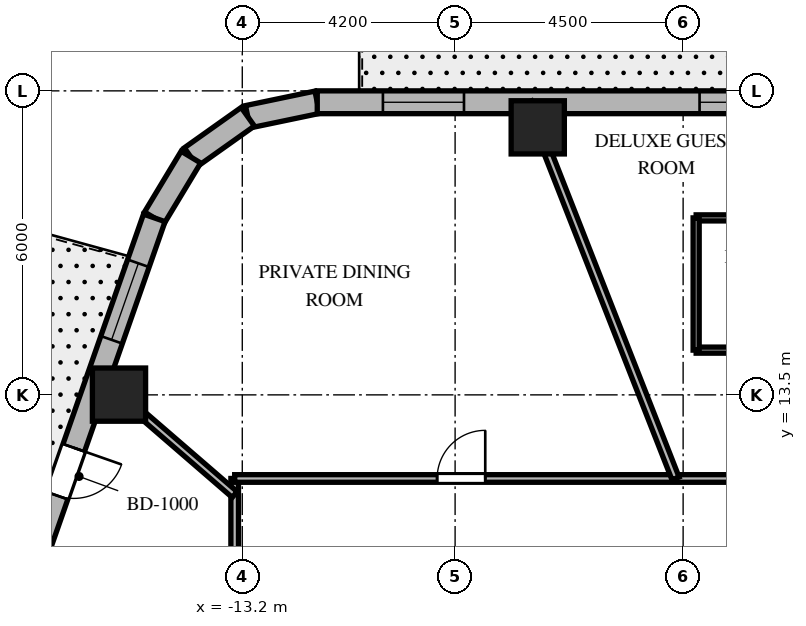
"""IFC4 building model, lengths in metres.
Left out: names, types, materials, properties, quantities, classifications, styles, units other than length and angle.
Written with IfcOpenShell. Run it as: python <this file> out.ifc"""

import sys

from ifc_helpers import new_model, si_unit, direction, frame, frame_2d, origin, origin_2d, place, context, subcontext, project, spatial, rectangle, extrude, element, fill, save


model = new_model("IFC4")
c1 = context("Model", 3, precision=1e-05, world=origin(), true_north=direction((0.0, 1.0)))
c2 = subcontext(c1, "Body", "Model", "MODEL_VIEW")
j1 = project(units=[si_unit("LENGTHUNIT", "METRE"), si_unit("PLANEANGLEUNIT", "RADIAN")], contexts=[c1])
p1 = place(None, origin())
s1 = spatial("IfcSite", under=j1, at=p1, CompositionType="ELEMENT")
p2 = place(p1, origin())
s2 = spatial("IfcBuilding", under=s1, at=p2, CompositionType="ELEMENT")
p3 = place(p2, frame((0.0, 0.0, 159.1)))
s3 = spatial("IfcBuildingStorey", under=s2, at=p3, CompositionType="ELEMENT", Elevation=159.1)
for number, where, z_axis, x_axis in (
    (1, (-7.369, 18.78, 0.0), (0.0, 0.0, 1.0), (1.0, 0.0, 0.0)),
    (2, (-15.633, 13.505, 0.0), (0.0, 0.0, 1.0), (1.0, 0.0, 0.0)),
):
    element("IfcColumn", number, at=place(p3, frame(where, z_axis=z_axis, x_axis=x_axis)), inside=s3, PredefinedType="COLUMN", context=c2, shape_type="SweptSolid", body=[
        extrude(rectangle(XDim=1.05, YDim=1.05, at=origin_2d()), origin(), (0.0, 0.0, 1.0), 3.7),
    ])
p4 = place(p3, frame((-11.72, 19.275, 0.0), z_axis=(0.0, 0.0, 1.0), x_axis=(-0.97893106758, -0.204191001093, 0.0)))
e3 = element("IfcWall", 3, at=p4, inside=s3, PredefinedType="SOLIDWALL", context=c2, shape_type="SweptSolid", body=[
    extrude(rectangle(XDim=1.4, YDim=0.45, at=frame_2d((0.7, 0.0))), origin(), (0.0, 0.0, 1.0), 3.4),
])
p5 = place(p3, frame((-13.091, 18.989, 0.0), z_axis=(0.0, 0.0, 1.0), x_axis=(-0.815574637848, -0.578651890258, 0.0)))
e4 = element("IfcWall", 4, at=p5, inside=s3, PredefinedType="SOLIDWALL", context=c2, shape_type="SweptSolid", body=[
    extrude(rectangle(XDim=1.377, YDim=0.45, at=frame_2d((0.688, 0.0))), origin(), (0.0, 0.0, 1.0), 3.4),
])
p6 = place(p3, frame((-14.214, 18.192, 0.0), z_axis=(0.0, 0.0, 1.0), x_axis=(-0.516340945502, -0.856383108193, 0.0)))
e5 = element("IfcWall", 5, at=p6, inside=s3, PredefinedType="SOLIDWALL", context=c2, shape_type="SweptSolid", body=[
    extrude(rectangle(XDim=1.4, YDim=0.45, at=frame_2d((0.7, 0.0))), origin(), (0.0, 0.0, 1.0), 3.4),
])
p7 = place(p3, frame((10.108, 19.275, 0.0), z_axis=(0.0, 0.0, 1.0), x_axis=(-1.0, 0.0, 0.0)))
e6 = element("IfcWall", 6, at=p7, inside=s3, PredefinedType="SOLIDWALL", context=c2, shape_type="SweptSolid", body=[
    extrude(rectangle(XDim=21.829, YDim=0.45, at=frame_2d((10.915, 0.0))), origin(), (0.0, 0.0, 1.0), 3.4),
])
p8 = place(p7, frame((5.503, 0.0, 0.0)))
e7 = element("IfcOpeningElement", 7, at=p8, cuts=e6, PredefinedType="OPENING", context=c2, shape_type="SweptSolid", body=[
    extrude(rectangle(XDim=0.95, YDim=2.15, at=frame_2d((0.475, 1.075))), frame((0.0, 0.235, 0.0), z_axis=(0.0, -1.0, 0.0), x_axis=(1.0, 0.0, 0.0)), (0.0, 0.0, 1.0), 0.47),
])
p9 = place(p7, frame((1.297, 0.0, 0.8)))
e8 = element("IfcOpeningElement", 8, at=p9, cuts=e6, PredefinedType="OPENING", context=c2, shape_type="SweptSolid", body=[
    extrude(rectangle(XDim=1.6, YDim=1.75, at=frame_2d((0.8, 0.875))), frame((0.0, 0.235, 0.0), z_axis=(0.0, -1.0, 0.0), x_axis=(1.0, 0.0, 0.0)), (0.0, 0.0, 1.0), 0.47),
])
p10 = place(p7, frame((7.402, 0.0, 0.8)))
e9 = element("IfcOpeningElement", 9, at=p10, cuts=e6, PredefinedType="OPENING", context=c2, shape_type="SweptSolid", body=[
    extrude(rectangle(XDim=1.6, YDim=1.75, at=frame_2d((0.8, 0.875))), frame((0.0, 0.235, 0.0), z_axis=(0.0, -1.0, 0.0), x_axis=(1.0, 0.0, 0.0)), (0.0, 0.0, 1.0), 0.47),
])
p11 = place(p7, frame((12.684, 0.0, 0.8)))
e10 = element("IfcOpeningElement", 10, at=p11, cuts=e6, PredefinedType="OPENING", context=c2, shape_type="SweptSolid", body=[
    extrude(rectangle(XDim=1.6, YDim=1.75, at=frame_2d((0.8, 0.875))), frame((0.0, 0.235, 0.0), z_axis=(0.0, -1.0, 0.0), x_axis=(1.0, 0.0, 0.0)), (0.0, 0.0, 1.0), 0.47),
])
p12 = place(p7, frame((18.933, 0.0, 0.8)))
e11 = element("IfcOpeningElement", 11, at=p12, cuts=e6, PredefinedType="OPENING", context=c2, shape_type="SweptSolid", body=[
    extrude(rectangle(XDim=1.6, YDim=1.75, at=frame_2d((0.8, 0.875))), frame((0.0, 0.235, 0.0), z_axis=(0.0, -1.0, 0.0), x_axis=(1.0, 0.0, 0.0)), (0.0, 0.0, 1.0), 0.47),
])
p13 = place(p3, frame((-14.937, 16.993, 0.0), z_axis=(0.0, 0.0, 1.0), x_axis=(-0.330431575061, -0.943829949834, 0.0)))
e12 = element("IfcWall", 12, at=p13, inside=s3, PredefinedType="SOLIDWALL", context=c2, shape_type="SweptSolid", body=[
    extrude(rectangle(XDim=17.689, YDim=0.45, at=frame_2d((8.844, 0.0))), origin(), (0.0, 0.0, 1.0), 3.4),
])
p14 = place(p13, frame((4.807, 0.0, 0.0)))
e13 = element("IfcOpeningElement", 13, at=p14, cuts=e12, PredefinedType="OPENING", context=c2, shape_type="SweptSolid", body=[
    extrude(rectangle(XDim=1.0, YDim=2.15, at=frame_2d((0.5, 1.075))), frame((0.0, 0.235, 0.0), z_axis=(0.0, -1.0, 0.0), x_axis=(1.0, 0.0, 0.0)), (0.0, 0.0, 1.0), 0.47),
])
p15 = place(p13, frame((0.95, 0.0, 0.8)))
e14 = element("IfcOpeningElement", 14, at=p15, cuts=e12, PredefinedType="OPENING", context=c2, shape_type="SweptSolid", body=[
    extrude(rectangle(XDim=1.6, YDim=1.75, at=frame_2d((0.8, 0.875))), frame((0.0, 0.235, 0.0), z_axis=(0.0, -1.0, 0.0), x_axis=(1.0, 0.0, 0.0)), (0.0, 0.0, 1.0), 0.47),
])
p16 = place(p13, frame((6.623, 0.0, 0.8)))
e15 = element("IfcOpeningElement", 15, at=p16, cuts=e12, PredefinedType="OPENING", context=c2, shape_type="SweptSolid", body=[
    extrude(rectangle(XDim=1.6, YDim=1.75, at=frame_2d((0.8, 0.875))), frame((0.0, 0.235, 0.0), z_axis=(0.0, -1.0, 0.0), x_axis=(1.0, 0.0, 0.0)), (0.0, 0.0, 1.0), 0.47),
])
p17 = place(p13, frame((10.849, 0.0, 0.8)))
e16 = element("IfcOpeningElement", 16, at=p17, cuts=e12, PredefinedType="OPENING", context=c2, shape_type="SweptSolid", body=[
    extrude(rectangle(XDim=1.6, YDim=1.75, at=frame_2d((0.8, 0.875))), frame((0.0, 0.235, 0.0), z_axis=(0.0, -1.0, 0.0), x_axis=(1.0, 0.0, 0.0)), (0.0, 0.0, 1.0), 0.47),
])
p18 = place(p13, frame((15.084, 0.0, 0.8)))
e17 = element("IfcOpeningElement", 17, at=p18, cuts=e12, PredefinedType="OPENING", context=c2, shape_type="SweptSolid", body=[
    extrude(rectangle(XDim=1.6, YDim=1.75, at=frame_2d((0.8, 0.875))), frame((0.0, 0.235, 0.0), z_axis=(0.0, -1.0, 0.0), x_axis=(1.0, 0.0, 0.0)), (0.0, 0.0, 1.0), 0.47),
])
p19 = place(p3, frame((-13.35, -11.85, 0.0), z_axis=(0.0, 0.0, 1.0), x_axis=(0.0, 1.0, 0.0)))
e18 = element("IfcWall", 18, at=p19, inside=s3, PredefinedType="PARTITIONING", context=c2, shape_type="SweptSolid", body=[
    extrude(rectangle(XDim=23.7, YDim=0.15, at=frame_2d((11.85, 0.0))), origin(), (0.0, 0.0, 1.0), 2.84),
])
p20 = place(p19, frame((20.136, 0.0, 0.0)))
e19 = element("IfcOpeningElement", 19, at=p20, cuts=e18, PredefinedType="OPENING", context=c2, shape_type="SweptSolid", body=[
    extrude(rectangle(XDim=0.9, YDim=2.03, at=frame_2d((0.45, 1.015))), frame((0.0, 0.085, 0.0), z_axis=(0.0, -1.0, 0.0), x_axis=(1.0, 0.0, 0.0)), (0.0, 0.0, 1.0), 0.17),
])
p21 = place(p19, frame((15.551, 0.0, 0.0)))
e20 = element("IfcOpeningElement", 20, at=p21, cuts=e18, PredefinedType="OPENING", context=c2, shape_type="SweptSolid", body=[
    extrude(rectangle(XDim=0.9, YDim=2.03, at=frame_2d((0.45, 1.015))), frame((0.0, 0.085, 0.0), z_axis=(0.0, -1.0, 0.0), x_axis=(1.0, 0.0, 0.0)), (0.0, 0.0, 1.0), 0.17),
])
p22 = place(p19, frame((12.494, 0.0, 0.0)))
e21 = element("IfcOpeningElement", 21, at=p22, cuts=e18, PredefinedType="OPENING", context=c2, shape_type="SweptSolid", body=[
    extrude(rectangle(XDim=0.9, YDim=2.03, at=frame_2d((0.45, 1.015))), frame((0.0, 0.085, 0.0), z_axis=(0.0, -1.0, 0.0), x_axis=(1.0, 0.0, 0.0)), (0.0, 0.0, 1.0), 0.17),
])
p23 = place(p19, frame((9.424, 0.0, 0.0)))
e22 = element("IfcOpeningElement", 22, at=p23, cuts=e18, PredefinedType="OPENING", context=c2, shape_type="SweptSolid", body=[
    extrude(rectangle(XDim=0.95, YDim=2.03, at=frame_2d((0.475, 1.015))), frame((0.0, 0.085, 0.0), z_axis=(0.0, -1.0, 0.0), x_axis=(1.0, 0.0, 0.0)), (0.0, 0.0, 1.0), 0.17),
])
p24 = place(p19, frame((3.765, 0.0, 0.0)))
e23 = element("IfcOpeningElement", 23, at=p24, cuts=e18, PredefinedType="OPENING", context=c2, shape_type="SweptSolid", body=[
    extrude(rectangle(XDim=0.9, YDim=2.03, at=frame_2d((0.45, 1.015))), frame((0.0, 0.085, 0.0), z_axis=(0.0, -1.0, 0.0), x_axis=(1.0, 0.0, 0.0)), (0.0, 0.0, 1.0), 0.17),
])
p25 = place(p3, frame((-13.35, 11.85, 0.0), z_axis=(0.0, 0.0, 1.0), x_axis=(1.0, 0.0, 0.0)))
e24 = element("IfcWall", 24, at=p25, inside=s3, PredefinedType="PARTITIONING", context=c2, shape_type="SweptSolid", body=[
    extrude(rectangle(XDim=26.7, YDim=0.15, at=frame_2d((13.35, 0.0))), origin(), (0.0, 0.0, 1.0), 2.84),
])
p26 = place(p25, frame((20.682, 0.0, 0.0)))
e25 = element("IfcOpeningElement", 25, at=p26, cuts=e24, PredefinedType="OPENING", context=c2, shape_type="SweptSolid", body=[
    extrude(rectangle(XDim=0.95, YDim=2.03, at=frame_2d((0.475, 1.015))), frame((0.0, 0.085, 0.0), z_axis=(0.0, -1.0, 0.0), x_axis=(1.0, 0.0, 0.0)), (0.0, 0.0, 1.0), 0.17),
])
p27 = place(p25, frame((14.708, 0.0, 0.0)))
e26 = element("IfcOpeningElement", 26, at=p27, cuts=e24, PredefinedType="OPENING", context=c2, shape_type="SweptSolid", body=[
    extrude(rectangle(XDim=0.95, YDim=2.03, at=frame_2d((0.475, 1.015))), frame((0.0, 0.085, 0.0), z_axis=(0.0, -1.0, 0.0), x_axis=(1.0, 0.0, 0.0)), (0.0, 0.0, 1.0), 0.17),
])
p28 = place(p25, frame((10.553, 0.0, 0.0)))
e27 = element("IfcOpeningElement", 27, at=p28, cuts=e24, PredefinedType="OPENING", context=c2, shape_type="SweptSolid", body=[
    extrude(rectangle(XDim=0.95, YDim=2.03, at=frame_2d((0.475, 1.015))), frame((0.0, 0.085, 0.0), z_axis=(0.0, -1.0, 0.0), x_axis=(1.0, 0.0, 0.0)), (0.0, 0.0, 1.0), 0.17),
])
p29 = place(p25, frame((3.995, 0.0, 0.0)))
e28 = element("IfcOpeningElement", 28, at=p29, cuts=e24, PredefinedType="OPENING", context=c2, shape_type="SweptSolid", body=[
    extrude(rectangle(XDim=0.95, YDim=2.03, at=frame_2d((0.475, 1.015))), frame((0.0, 0.085, 0.0), z_axis=(0.0, -1.0, 0.0), x_axis=(1.0, 0.0, 0.0)), (0.0, 0.0, 1.0), 0.17),
])
p30 = place(p3, frame((-4.65, 11.85, 0.0), z_axis=(0.0, 0.0, 1.0), x_axis=(-0.365265947993, 0.930903210456, 0.0)))
e29 = element("IfcWall", 29, at=p30, inside=s3, PredefinedType="PARTITIONING", context=c2, shape_type="SweptSolid", body=[
    extrude(rectangle(XDim=7.976, YDim=0.15, at=frame_2d((3.988, 0.0))), origin(), (0.0, 0.0, 1.0), 2.64),
])
p31 = place(p3, frame((-13.35, 11.533, 0.0), z_axis=(0.0, 0.0, 1.0), x_axis=(-0.756711647314, 0.65374879183, 0.0)))
e30 = element("IfcWall", 30, at=p31, inside=s3, PredefinedType="PARTITIONING", context=c2, shape_type="SweptSolid", body=[
    extrude(rectangle(XDim=3.55, YDim=0.15, at=frame_2d((1.775, 0.0))), origin(), (0.0, 0.0, 1.0), 2.64),
])
p32 = place(p3, frame((-4.243, 14.383, 0.0), z_axis=(0.0, 0.0, 1.0), x_axis=(1.0, 0.0, 0.0)))
e31 = element("IfcWall", 31, at=p32, inside=s3, PredefinedType="PARTITIONING", context=c2, shape_type="SweptSolid", body=[
    extrude(rectangle(XDim=2.44, YDim=0.12, at=frame_2d((1.22, 0.0))), origin(), (0.0, 0.0, 1.0), 3.4),
])
p33 = place(p32, frame((0.795, 0.0, 0.0)))
e32 = element("IfcOpeningElement", 32, at=p33, cuts=e31, PredefinedType="OPENING", context=c2, shape_type="SweptSolid", body=[
    extrude(rectangle(XDim=0.85, YDim=2.03, at=frame_2d((0.425, 1.015))), frame((0.0, 0.07, 0.0), z_axis=(0.0, -1.0, 0.0), x_axis=(1.0, 0.0, 0.0)), (0.0, 0.0, 1.0), 0.14),
])
p34 = place(p3, frame((-1.803, 16.993, 0.0), z_axis=(0.0, 0.0, 1.0), x_axis=(-1.0, 0.0, 0.0)))
e33 = element("IfcWall", 33, at=p34, inside=s3, PredefinedType="PARTITIONING", context=c2, shape_type="SweptSolid", body=[
    extrude(rectangle(XDim=2.44, YDim=0.12, at=frame_2d((1.22, 0.0))), origin(), (0.0, 0.0, 1.0), 3.4),
])
p35 = place(p3, frame((-4.243, 16.993, 0.0), z_axis=(0.0, 0.0, 1.0), x_axis=(0.0, -1.0, 0.0)))
e34 = element("IfcWall", 34, at=p35, inside=s3, PredefinedType="PARTITIONING", context=c2, shape_type="SweptSolid", body=[
    extrude(rectangle(XDim=2.61, YDim=0.12, at=frame_2d((1.305, 0.0))), origin(), (0.0, 0.0, 1.0), 2.84),
])
p36 = place(p11, origin())
e35 = element("IfcWindow", 35, at=p36, inside=s3, PartitioningType="SINGLE_PANEL", PredefinedType="WINDOW", context=c2, shape_type="SweptSolid", body=[
    extrude(rectangle(XDim=1.6, YDim=1.75, at=frame_2d((0.8, 0.875))), frame((0.0, 0.03, 0.0), z_axis=(0.0, -1.0, 0.0), x_axis=(1.0, 0.0, 0.0)), (0.0, 0.0, 1.0), 0.06),
])
fill(e10, e35)
p37 = place(p12, origin())
e36 = element("IfcWindow", 36, at=p37, inside=s3, PartitioningType="SINGLE_PANEL", PredefinedType="WINDOW", context=c2, shape_type="SweptSolid", body=[
    extrude(rectangle(XDim=1.6, YDim=1.75, at=frame_2d((0.8, 0.875))), frame((0.0, 0.03, 0.0), z_axis=(0.0, -1.0, 0.0), x_axis=(1.0, 0.0, 0.0)), (0.0, 0.0, 1.0), 0.06),
])
fill(e11, e36)
p38 = place(p14, origin())
e37 = element("IfcDoor", 37, at=p38, inside=s3, OperationType="SINGLE_SWING_LEFT", PredefinedType="DOOR", context=c2, shape_type="SweptSolid", body=[
    extrude(rectangle(XDim=1.0, YDim=2.15, at=frame_2d((0.5, 1.075))), frame((0.0, 0.025, 0.0), z_axis=(0.0, -1.0, 0.0), x_axis=(1.0, 0.0, 0.0)), (0.0, 0.0, 1.0), 0.05),
])
fill(e13, e37)
p39 = place(p15, origin())
e38 = element("IfcWindow", 38, at=p39, inside=s3, PartitioningType="SINGLE_PANEL", PredefinedType="WINDOW", context=c2, shape_type="SweptSolid", body=[
    extrude(rectangle(XDim=1.6, YDim=1.75, at=frame_2d((0.8, 0.875))), frame((0.0, 0.03, 0.0), z_axis=(0.0, -1.0, 0.0), x_axis=(1.0, 0.0, 0.0)), (0.0, 0.0, 1.0), 0.06),
])
fill(e14, e38)
p40 = place(p29, origin())
e39 = element("IfcDoor", 39, at=p40, inside=s3, OperationType="SINGLE_SWING_RIGHT", PredefinedType="DOOR", context=c2, shape_type="SweptSolid", body=[
    extrude(rectangle(XDim=0.95, YDim=2.03, at=frame_2d((0.475, 1.015))), frame((0.0, 0.025, 0.0), z_axis=(0.0, -1.0, 0.0), x_axis=(1.0, 0.0, 0.0)), (0.0, 0.0, 1.0), 0.05),
])
fill(e28, e39)
save(model, sys.argv[1])
